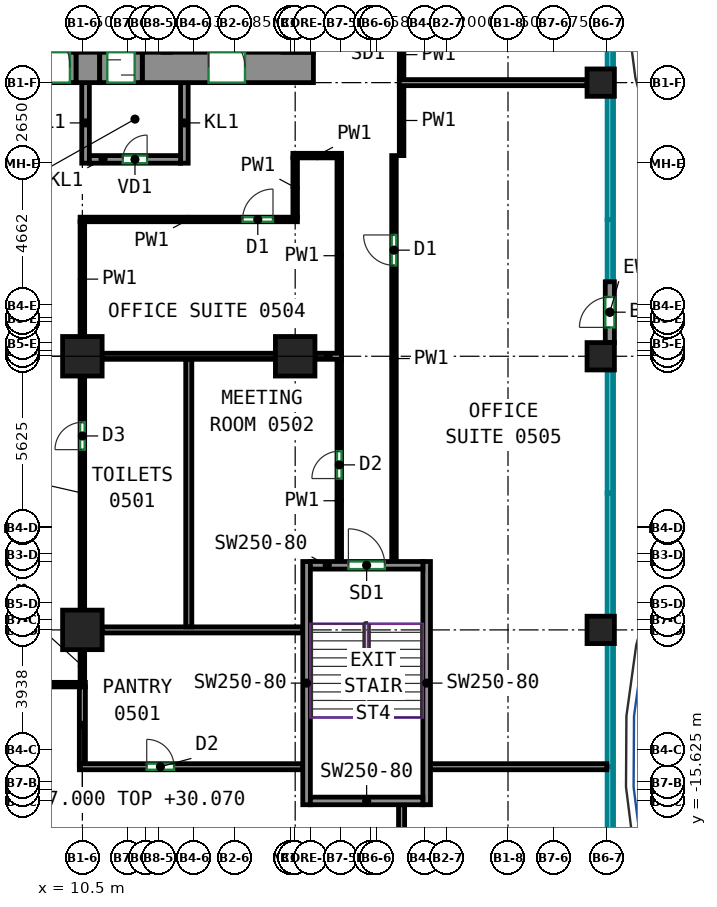
"""IFC4 building model, lengths in metres.
Left out: names, types, materials, properties, quantities, classifications, styles, units other than length and angle.
Written with IfcOpenShell. Run it as: python <this file> out.ifc"""

import sys

from ifc_helpers import new_model, si_unit, direction, frame, frame_2d, origin, origin_2d, place, context, subcontext, project, spatial, rectangle, extrude, source, transform, mapped, element, fill, save


model = new_model("IFC4")
c1 = context("Model", 3, precision=1e-05, world=origin(), true_north=direction((0.0, 1.0)))
c2 = subcontext(c1, "Body", "Model", "MODEL_VIEW")
j1 = project(units=[si_unit("LENGTHUNIT", "METRE"), si_unit("PLANEANGLEUNIT", "RADIAN")], contexts=[c1])
p1 = place(None, origin())
s1 = spatial("IfcSite", under=j1, at=p1, CompositionType="ELEMENT")
p2 = place(p1, origin())
s2 = spatial("IfcBuilding", under=s1, at=p2, CompositionType="ELEMENT")
p3 = place(p2, frame((0.0, 0.0, 27.0)))
s3 = spatial("IfcBuildingStorey", under=s2, at=p3, CompositionType="ELEMENT", Elevation=27.0)
m1 = source(origin(), c2, "Body", "SweptSolid", [
    extrude(rectangle(XDim=1.3, YDim=1.3, at=origin_2d()), origin(), (0.0, 0.0, 1.0), 3.72),
])
for number, where, z_axis, x_axis in (
    (1, (10.5, -10.0, 0.0), (0.0, 0.0, 1.0), (1.0, 0.0, 0.0)),
    (2, (10.5, -1.0, 0.0), (0.0, 0.0, 1.0), (1.0, 0.0, 0.0)),
    (3, (17.5, -1.0, 0.0), (0.0, 0.0, 1.0), (1.0, 0.0, 0.0)),
):
    element("IfcColumn", number, at=place(p3, frame(where, z_axis=z_axis, x_axis=x_axis)), inside=s3, PredefinedType="COLUMN", context=c2, shape_type="MappedRepresentation", body=[
        mapped(m1, transform((0.0, 0.0, 0.0))),
    ])
m2 = source(origin(), c2, "Body", "SweptSolid", [
    extrude(rectangle(XDim=0.9, YDim=0.9, at=origin_2d()), origin(), (0.0, 0.0, 1.0), 3.72),
])
for number, where, z_axis, x_axis in (
    (4, (27.55, -10.0, 0.0), (0.0, 0.0, 1.0), (1.0, 0.0, 0.0)),
    (5, (27.55, -1.0, 0.0), (0.0, 0.0, 1.0), (1.0, 0.0, 0.0)),
    (6, (27.55, 8.0, 0.0), (0.0, 0.0, 1.0), (1.0, 0.0, 0.0)),
):
    element("IfcColumn", number, at=place(p3, frame(where, z_axis=z_axis, x_axis=x_axis)), inside=s3, PredefinedType="COLUMN", context=c2, shape_type="MappedRepresentation", body=[
        mapped(m2, transform((0.0, 0.0, 0.0))),
    ])
m3 = source(origin(), c2, "Body", "SweptSolid", [
    extrude(rectangle(XDim=0.78, YDim=1.0, at=frame_2d((0.39, 0.0))), origin(), (0.0, 0.0, 1.0), 3.72),
])
p4 = place(p3, frame((10.29, 8.5, 0.0), z_axis=(0.0, 0.0, 1.0), x_axis=(1.0, 0.0, 0.0)))
e7 = element("IfcWall", 7, at=p4, inside=s3, PredefinedType="SHEAR", context=c2, shape_type="MappedRepresentation", body=[
    mapped(m3, transform((0.0, 0.0, 0.0))),
])
m4 = source(origin(), c2, "Body", "SweptSolid", [
    extrude(rectangle(XDim=5.63, YDim=1.0, at=frame_2d((2.815, 0.0))), origin(), (0.0, 0.0, 1.0), 3.72),
])
p5 = place(p3, frame((12.47, 8.5, 0.0), z_axis=(0.0, 0.0, 1.0), x_axis=(1.0, 0.0, 0.0)))
e8 = element("IfcWall", 8, at=p5, inside=s3, PredefinedType="SHEAR", context=c2, shape_type="MappedRepresentation", body=[
    mapped(m4, transform((0.0, 0.0, 0.0))),
])
p6 = place(p5, frame((2.18, 0.0, 0.0)))
e9 = element("IfcOpeningElement", 9, at=p6, cuts=e8, PredefinedType="OPENING", context=c2, shape_type="SweptSolid", body=[
    extrude(rectangle(XDim=1.2, YDim=2.1, at=frame_2d((0.6, 1.05))), frame((0.0, 0.51, 0.0), z_axis=(0.0, -1.0, 0.0), x_axis=(1.0, 0.0, 0.0)), (0.0, 0.0, 1.0), 1.02),
])
m5 = source(origin(), c2, "Body", "SweptSolid", [
    extrude(rectangle(XDim=8.0, YDim=0.25, at=frame_2d((4.0, 0.0))), origin(), (0.0, 0.0, 1.0), 3.72),
])
for number, where, z_axis, x_axis in (
    (10, (17.875, -15.75, 0.0), (0.0, 0.0, 1.0), (0.0, 1.0, 0.0)),
    (11, (21.825, -15.75, 0.0), (0.0, 0.0, 1.0), (0.0, 1.0, 0.0)),
):
    element("IfcWall", number, at=place(p3, frame(where, z_axis=z_axis, x_axis=x_axis)), inside=s3, PredefinedType="SHEAR", context=c2, shape_type="MappedRepresentation", body=[
        mapped(m5, transform((0.0, 0.0, 0.0))),
    ])
m6 = source(origin(), c2, "Body", "SweptSolid", [
    extrude(rectangle(XDim=3.7, YDim=0.25, at=frame_2d((1.85, 0.0))), origin(), (0.0, 0.0, 1.0), 3.72),
])
p7 = place(p3, frame((18.0, -15.625, 0.0), z_axis=(0.0, 0.0, 1.0), x_axis=(1.0, 0.0, 0.0)))
e12 = element("IfcWall", 12, at=p7, inside=s3, PredefinedType="SHEAR", context=c2, shape_type="MappedRepresentation", body=[
    mapped(m6, transform((0.0, 0.0, 0.0))),
])
p8 = place(p3, frame((18.0, -7.875, 0.0), z_axis=(0.0, 0.0, 1.0), x_axis=(1.0, 0.0, 0.0)))
e13 = element("IfcWall", 13, at=p8, inside=s3, PredefinedType="SHEAR", context=c2, shape_type="MappedRepresentation", body=[
    mapped(m6, transform((0.0, 0.0, 0.0))),
])
p9 = place(p8, frame((1.25, 0.0, 0.0)))
e14 = element("IfcOpeningElement", 14, at=p9, cuts=e13, PredefinedType="OPENING", context=c2, shape_type="SweptSolid", body=[
    extrude(rectangle(XDim=1.2, YDim=2.1, at=frame_2d((0.6, 1.05))), frame((0.0, 0.135, 0.0), z_axis=(0.0, -1.0, 0.0), x_axis=(1.0, 0.0, 0.0)), (0.0, 0.0, 1.0), 0.27),
])
m7 = source(origin(), c2, "Body", "SweptSolid", [
    extrude(rectangle(XDim=2.0, YDim=0.3, at=frame_2d((1.0, 0.0))), origin(), (0.0, 0.0, 1.0), 3.72),
])
p10 = place(p3, frame((27.85, -0.55, 0.0), z_axis=(0.0, 0.0, 1.0), x_axis=(0.0, 1.0, 0.0)))
e15 = element("IfcWall", 15, at=p10, inside=s3, PredefinedType="SOLIDWALL", context=c2, shape_type="MappedRepresentation", body=[
    mapped(m7, transform((0.0, 0.0, 0.0))),
])
p11 = place(p10, frame((0.5, 0.0, 0.0)))
e16 = element("IfcOpeningElement", 16, at=p11, cuts=e15, PredefinedType="OPENING", context=c2, shape_type="SweptSolid", body=[
    extrude(rectangle(XDim=1.0, YDim=2.1, at=frame_2d((0.5, 1.05))), frame((0.0, 0.16, 0.0), z_axis=(0.0, -1.0, 0.0), x_axis=(1.0, 0.0, 0.0)), (0.0, 0.0, 1.0), 0.32),
])
m8 = source(origin(), c2, "Body", "SweptSolid", [
    extrude(rectangle(XDim=2.65, YDim=0.25, at=frame_2d((1.325, 0.0))), origin(), (0.0, 0.0, 1.0), 3.72),
])
for number, where, z_axis, x_axis in (
    (17, (10.605, 5.35, 0.0), (0.0, 0.0, 1.0), (0.0, 1.0, 0.0)),
    (18, (13.855, 5.35, 0.0), (0.0, 0.0, 1.0), (0.0, 1.0, 0.0)),
):
    element("IfcWall", number, at=place(p3, frame(where, z_axis=z_axis, x_axis=x_axis)), inside=s3, PredefinedType="PARTITIONING", context=c2, shape_type="MappedRepresentation", body=[
        mapped(m8, transform((0.0, 0.0, 0.0))),
    ])
m9 = source(origin(), c2, "Body", "SweptSolid", [
    extrude(rectangle(XDim=3.0, YDim=0.25, at=frame_2d((1.5, 0.0))), origin(), (0.0, 0.0, 1.0), 3.72),
])
p12 = place(p3, frame((10.73, 5.475, 0.0), z_axis=(0.0, 0.0, 1.0), x_axis=(1.0, 0.0, 0.0)))
e19 = element("IfcWall", 19, at=p12, inside=s3, PredefinedType="PARTITIONING", context=c2, shape_type="MappedRepresentation", body=[
    mapped(m9, transform((0.0, 0.0, 0.0))),
])
p13 = place(p12, frame((1.1, 0.0, 0.0)))
e20 = element("IfcOpeningElement", 20, at=p13, cuts=e19, PredefinedType="OPENING", context=c2, shape_type="SweptSolid", body=[
    extrude(rectangle(XDim=0.8, YDim=2.0, at=frame_2d((0.4, 1.0))), frame((0.0, 0.135, 0.0), z_axis=(0.0, -1.0, 0.0), x_axis=(1.0, 0.0, 0.0)), (0.0, 0.0, 1.0), 0.27),
])
m10 = source(origin(), c2, "Body", "SweptSolid", [
    extrude(rectangle(XDim=2.4, YDim=1.0, at=frame_2d((1.2, 0.0))), origin(), (0.0, 0.0, 1.0), 2.7),
])
p14 = place(p3, frame((7.89, 8.5, 0.0), z_axis=(0.0, 0.0, 1.0), x_axis=(1.0, 0.0, 0.0)))
e21 = element("IfcWall", 21, at=p14, inside=s3, PredefinedType="PARTITIONING", context=c2, shape_type="MappedRepresentation", body=[
    mapped(m10, transform((0.0, 0.0, 0.0))),
])
p15 = place(p14, frame((0.2, 0.0, 0.0)))
e22 = element("IfcOpeningElement", 22, at=p15, cuts=e21, PredefinedType="OPENING", context=c2, shape_type="SweptSolid", body=[
    extrude(rectangle(XDim=2.0, YDim=2.1, at=frame_2d((1.0, 1.05))), frame((0.0, 0.51, 0.0), z_axis=(0.0, -1.0, 0.0), x_axis=(1.0, 0.0, 0.0)), (0.0, 0.0, 1.0), 1.02),
])
m11 = source(origin(), c2, "Body", "SweptSolid", [
    extrude(rectangle(XDim=1.4, YDim=1.0, at=frame_2d((0.7, 0.0))), origin(), (0.0, 0.0, 1.0), 2.7),
])
p16 = place(p3, frame((11.07, 8.5, 0.0), z_axis=(0.0, 0.0, 1.0), x_axis=(1.0, 0.0, 0.0)))
e23 = element("IfcWall", 23, at=p16, inside=s3, PredefinedType="PARTITIONING", context=c2, shape_type="MappedRepresentation", body=[
    mapped(m11, transform((0.0, 0.0, 0.0))),
])
p17 = place(p16, frame((0.25, 0.0, 0.0)))
e24 = element("IfcOpeningElement", 24, at=p17, cuts=e23, PredefinedType="OPENING", context=c2, shape_type="SweptSolid", body=[
    extrude(rectangle(XDim=0.9, YDim=2.1, at=frame_2d((0.45, 1.05))), frame((0.0, 0.51, 0.0), z_axis=(0.0, -1.0, 0.0), x_axis=(1.0, 0.0, 0.0)), (0.0, 0.0, 1.0), 1.02),
])
p18 = place(p3, frame((-10.575, -11.8, 0.0), z_axis=(0.0, 0.0, 1.0), x_axis=(1.0, 0.0, 0.0)))
e25 = element("IfcWall", 25, at=p18, inside=s3, PredefinedType="PARTITIONING", context=c2, shape_type="SweptSolid", body=[
    extrude(rectangle(XDim=21.175, YDim=0.15, at=frame_2d((10.587, 0.0))), origin(), (0.0, 0.0, 1.0), 3.72),
])
p19 = place(p18, frame((4.544, 0.0, 0.0)))
e26 = element("IfcOpeningElement", 26, at=p19, cuts=e25, PredefinedType="OPENING", context=c2, shape_type="SweptSolid", body=[
    extrude(rectangle(XDim=1.8, YDim=2.1, at=frame_2d((0.9, 1.05))), frame((0.0, 0.085, 0.0), z_axis=(0.0, -1.0, 0.0), x_axis=(1.0, 0.0, 0.0)), (0.0, 0.0, 1.0), 0.17),
])
p20 = place(p18, frame((17.372, 0.0, 0.0)))
e27 = element("IfcOpeningElement", 27, at=p20, cuts=e25, PredefinedType="OPENING", context=c2, shape_type="SweptSolid", body=[
    extrude(rectangle(XDim=0.9, YDim=2.1, at=frame_2d((0.45, 1.05))), frame((0.0, 0.085, 0.0), z_axis=(0.0, -1.0, 0.0), x_axis=(1.0, 0.0, 0.0)), (0.0, 0.0, 1.0), 0.17),
])
p21 = place(p3, frame((10.5, -11.725, 0.0), z_axis=(0.0, 0.0, 1.0), x_axis=(0.0, 1.0, 0.0)))
e28 = element("IfcWall", 28, at=p21, inside=s3, PredefinedType="PARTITIONING", context=c2, shape_type="SweptSolid", body=[
    extrude(rectangle(XDim=1.075, YDim=0.15, at=frame_2d((0.538, 0.0))), origin(), (0.0, 0.0, 1.0), 3.07),
])
p22 = place(p3, frame((10.5, -9.35, 0.0), z_axis=(0.0, 0.0, 1.0), x_axis=(0.0, 1.0, 0.0)))
e29 = element("IfcWall", 29, at=p22, inside=s3, PredefinedType="PARTITIONING", context=c2, shape_type="SweptSolid", body=[
    extrude(rectangle(XDim=7.7, YDim=0.15, at=frame_2d((3.85, 0.0))), origin(), (0.0, 0.0, 1.0), 3.07),
])
p23 = place(p22, frame((5.279, 0.0, 0.0)))
e30 = element("IfcOpeningElement", 30, at=p23, cuts=e29, PredefinedType="OPENING", context=c2, shape_type="SweptSolid", body=[
    extrude(rectangle(XDim=0.9, YDim=2.1, at=frame_2d((0.45, 1.05))), frame((0.0, 0.085, 0.0), z_axis=(0.0, -1.0, 0.0), x_axis=(1.0, 0.0, 0.0)), (0.0, 0.0, 1.0), 0.17),
])
p24 = place(p3, frame((18.95, -7.75, 0.0), z_axis=(0.0, 0.0, 1.0), x_axis=(0.0, 1.0, 0.0)))
e31 = element("IfcWall", 31, at=p24, inside=s3, PredefinedType="PARTITIONING", context=c2, shape_type="SweptSolid", body=[
    extrude(rectangle(XDim=6.66, YDim=0.15, at=frame_2d((3.33, 0.0))), origin(), (0.0, 0.0, 1.0), 3.72),
])
p25 = place(p24, frame((2.728, 0.0, 0.0)))
e32 = element("IfcOpeningElement", 32, at=p25, cuts=e31, PredefinedType="OPENING", context=c2, shape_type="SweptSolid", body=[
    extrude(rectangle(XDim=0.9, YDim=2.1, at=frame_2d((0.45, 1.05))), frame((0.0, 0.085, 0.0), z_axis=(0.0, -1.0, 0.0), x_axis=(1.0, 0.0, 0.0)), (0.0, 0.0, 1.0), 0.17),
])
p26 = place(p3, frame((18.95, -0.91, 0.0), z_axis=(0.0, 0.0, 1.0), x_axis=(0.0, 1.0, 0.0)))
e33 = element("IfcWall", 33, at=p26, inside=s3, PredefinedType="PARTITIONING", context=c2, shape_type="SweptSolid", body=[
    extrude(rectangle(XDim=6.435, YDim=0.15, at=frame_2d((3.217, 0.0))), origin(), (0.0, 0.0, 1.0), 3.72),
])
p27 = place(p3, frame((17.425, 5.6, 0.0), z_axis=(0.0, 0.0, 1.0), x_axis=(1.0, 0.0, 0.0)))
e34 = element("IfcWall", 34, at=p27, inside=s3, PredefinedType="PARTITIONING", context=c2, shape_type="SweptSolid", body=[
    extrude(rectangle(XDim=1.6, YDim=0.15, at=frame_2d((0.8, 0.0))), origin(), (0.0, 0.0, 1.0), 3.72),
])
p28 = place(p3, frame((17.5, 3.575, 0.0), z_axis=(0.0, 0.0, 1.0), x_axis=(0.0, 1.0, 0.0)))
e35 = element("IfcWall", 35, at=p28, inside=s3, PredefinedType="PARTITIONING", context=c2, shape_type="SweptSolid", body=[
    extrude(rectangle(XDim=1.95, YDim=0.15, at=frame_2d((0.975, 0.0))), origin(), (0.0, 0.0, 1.0), 3.72),
])
p29 = place(p3, frame((10.425, 3.5, 0.0), z_axis=(0.0, 0.0, 1.0), x_axis=(1.0, 0.0, 0.0)))
e36 = element("IfcWall", 36, at=p29, inside=s3, PredefinedType="PARTITIONING", context=c2, shape_type="SweptSolid", body=[
    extrude(rectangle(XDim=7.15, YDim=0.15, at=frame_2d((3.575, 0.0))), origin(), (0.0, 0.0, 1.0), 3.72),
])
p30 = place(p29, frame((5.345, 0.0, 0.0)))
e37 = element("IfcOpeningElement", 37, at=p30, cuts=e36, PredefinedType="OPENING", context=c2, shape_type="SweptSolid", body=[
    extrude(rectangle(XDim=1.0, YDim=2.1, at=frame_2d((0.5, 1.05))), frame((0.0, 0.085, 0.0), z_axis=(0.0, -1.0, 0.0), x_axis=(1.0, 0.0, 0.0)), (0.0, 0.0, 1.0), 0.17),
])
p31 = place(p3, frame((10.5, -0.35, 0.0), z_axis=(0.0, 0.0, 1.0), x_axis=(0.0, 1.0, 0.0)))
e38 = element("IfcWall", 38, at=p31, inside=s3, PredefinedType="PARTITIONING", context=c2, shape_type="SweptSolid", body=[
    extrude(rectangle(XDim=3.775, YDim=0.15, at=frame_2d((1.888, 0.0))), origin(), (0.0, 0.0, 1.0), 3.72),
])
p32 = place(p3, frame((21.0, 5.6, 0.0), z_axis=(0.0, 0.0, 1.0), x_axis=(0.0, 1.0, 0.0)))
e39 = element("IfcWall", 39, at=p32, inside=s3, PredefinedType="PARTITIONING", context=c2, shape_type="SweptSolid", body=[
    extrude(rectangle(XDim=2.31, YDim=0.15, at=frame_2d((1.155, 0.0))), origin(), (0.0, 0.0, 1.0), 3.72),
])
p33 = place(p3, frame((20.75, -7.75, 0.0), z_axis=(0.0, 0.0, 1.0), x_axis=(0.0, 1.0, 0.0)))
e40 = element("IfcWall", 40, at=p33, inside=s3, PredefinedType="PARTITIONING", context=c2, shape_type="SweptSolid", body=[
    extrude(rectangle(XDim=13.35, YDim=0.15, at=frame_2d((6.675, 0.0))), origin(), (0.0, 0.0, 1.0), 3.72),
])
p34 = place(p33, frame((9.74, 0.0, 0.0)))
e41 = element("IfcOpeningElement", 41, at=p34, cuts=e40, PredefinedType="OPENING", context=c2, shape_type="SweptSolid", body=[
    extrude(rectangle(XDim=1.0, YDim=2.1, at=frame_2d((0.5, 1.05))), frame((0.0, 0.085, 0.0), z_axis=(0.0, -1.0, 0.0), x_axis=(1.0, 0.0, 0.0)), (0.0, 0.0, 1.0), 0.17),
])
p35 = place(p3, frame((21.0, 8.09, 0.0), z_axis=(0.0, 0.0, 1.0), x_axis=(0.0, 1.0, 0.0)))
e42 = element("IfcWall", 42, at=p35, inside=s3, PredefinedType="PARTITIONING", context=c2, shape_type="SweptSolid", body=[
    extrude(rectangle(XDim=1.66, YDim=0.15, at=frame_2d((0.83, 0.0))), origin(), (0.0, 0.0, 1.0), 3.72),
])
p36 = place(p3, frame((21.0, -15.75, 0.0), z_axis=(0.0, 0.0, 1.0), x_axis=(0.0, -1.0, 0.0)))
e43 = element("IfcWall", 43, at=p36, inside=s3, PredefinedType="PARTITIONING", context=c2, shape_type="SweptSolid", body=[
    extrude(rectangle(XDim=3.15, YDim=0.2, at=frame_2d((1.575, 0.0))), origin(), (0.0, 0.0, 1.0), 3.72),
])
p37 = place(p3, frame((21.95, -14.5, 0.0), z_axis=(0.0, 0.0, 1.0), x_axis=(1.0, 0.0, 0.0)))
e44 = element("IfcWall", 44, at=p37, inside=s3, PredefinedType="PARTITIONING", context=c2, shape_type="SweptSolid", body=[
    extrude(rectangle(XDim=5.8, YDim=0.2, at=frame_2d((2.9, 0.0))), origin(), (0.0, 0.0, 1.0), 3.72),
])
p38 = place(p3, frame((10.5, -14.4, 0.0), z_axis=(0.0, 0.0, 1.0), x_axis=(0.0, 1.0, 0.0)))
e45 = element("IfcWall", 45, at=p38, inside=s3, PredefinedType="PARTITIONING", context=c2, shape_type="SweptSolid", body=[
    extrude(rectangle(XDim=2.524, YDim=0.2, at=frame_2d((1.262, 0.0))), origin(), (0.0, 0.0, 1.0), 3.07),
])
p39 = place(p3, frame((10.4, -14.5, 0.0), z_axis=(0.0, 0.0, 1.0), x_axis=(1.0, 0.0, 0.0)))
e46 = element("IfcWall", 46, at=p39, inside=s3, PredefinedType="PARTITIONING", context=c2, shape_type="SweptSolid", body=[
    extrude(rectangle(XDim=7.35, YDim=0.2, at=frame_2d((3.675, 0.0))), origin(), (0.0, 0.0, 1.0), 3.72),
])
p40 = place(p39, frame((2.217, 0.0, 0.0)))
e47 = element("IfcOpeningElement", 47, at=p40, cuts=e46, PredefinedType="OPENING", context=c2, shape_type="SweptSolid", body=[
    extrude(rectangle(XDim=0.9, YDim=2.1, at=frame_2d((0.45, 1.05))), frame((0.0, 0.11, 0.0), z_axis=(0.0, -1.0, 0.0), x_axis=(1.0, 0.0, 0.0)), (0.0, 0.0, 1.0), 0.22),
])
p41 = place(p3, frame((11.15, -10.0, 0.0), z_axis=(0.0, 0.0, 1.0), x_axis=(1.0, 0.0, 0.0)))
e48 = element("IfcWall", 48, at=p41, inside=s3, PredefinedType="PARTITIONING", context=c2, shape_type="SweptSolid", body=[
    extrude(rectangle(XDim=6.6, YDim=0.2, at=frame_2d((3.3, 0.0))), origin(), (0.0, 0.0, 1.0), 3.72),
])
p42 = place(p3, frame((14.0, -9.9, 0.0), z_axis=(0.0, 0.0, 1.0), x_axis=(0.0, 1.0, 0.0)))
e49 = element("IfcWall", 49, at=p42, inside=s3, PredefinedType="PARTITIONING", context=c2, shape_type="SweptSolid", body=[
    extrude(rectangle(XDim=8.8, YDim=0.2, at=frame_2d((4.4, 0.0))), origin(), (0.0, 0.0, 1.0), 3.72),
])
p43 = place(p3, frame((11.15, -1.0, 0.0), z_axis=(0.0, 0.0, 1.0), x_axis=(1.0, 0.0, 0.0)))
e50 = element("IfcWall", 50, at=p43, inside=s3, PredefinedType="PARTITIONING", context=c2, shape_type="SweptSolid", body=[
    extrude(rectangle(XDim=5.7, YDim=0.2, at=frame_2d((2.85, 0.0))), origin(), (0.0, 0.0, 1.0), 3.72),
])
p44 = place(p3, frame((18.15, -1.0, 0.0), z_axis=(0.0, 0.0, 1.0), x_axis=(1.0, 0.0, 0.0)))
e51 = element("IfcWall", 51, at=p44, inside=s3, PredefinedType="PARTITIONING", context=c2, shape_type="SweptSolid", body=[
    extrude(rectangle(XDim=0.874, YDim=0.2, at=frame_2d((0.437, 0.0))), origin(), (0.0, 0.0, 1.0), 3.07),
])
p45 = place(p3, frame((20.926, 8.0, 0.0), z_axis=(0.0, 0.0, 1.0), x_axis=(1.0, 0.0, 0.0)))
e52 = element("IfcWall", 52, at=p45, inside=s3, PredefinedType="PARTITIONING", context=c2, shape_type="SweptSolid", body=[
    extrude(rectangle(XDim=6.174, YDim=0.2, at=frame_2d((3.087, 0.0))), origin(), (0.0, 0.0, 1.0), 3.72),
])
p46 = place(p11, origin())
e53 = element("IfcDoor", 53, at=p46, inside=s3, OperationType="SINGLE_SWING_LEFT", PredefinedType="DOOR", context=c2, shape_type="SweptSolid", body=[
    extrude(rectangle(XDim=1.0, YDim=2.1, at=frame_2d((0.5, 1.05))), frame((0.0, 0.025, 0.0), z_axis=(0.0, -1.0, 0.0), x_axis=(1.0, 0.0, 0.0)), (0.0, 0.0, 1.0), 0.05),
])
fill(e16, e53)
p47 = place(p15, origin())
e54 = element("IfcDoor", 54, at=p47, inside=s3, OperationType="DOUBLE_DOOR_SINGLE_SWING", PredefinedType="DOOR", context=c2, shape_type="SweptSolid", body=[
    extrude(rectangle(XDim=2.0, YDim=2.1, at=frame_2d((1.0, 1.05))), frame((0.0, 0.405, 0.0), z_axis=(0.0, -1.0, 0.0), x_axis=(1.0, 0.0, 0.0)), (0.0, 0.0, 1.0), 0.05),
])
fill(e22, e54)
p48 = place(p13, origin())
e55 = element("IfcDoor", 55, at=p48, inside=s3, OperationType="SINGLE_SWING_RIGHT", PredefinedType="DOOR", context=c2, shape_type="SweptSolid", body=[
    extrude(rectangle(XDim=0.8, YDim=2.0, at=frame_2d((0.4, 1.0))), frame((0.0, 0.025, 0.0), z_axis=(0.0, -1.0, 0.0), x_axis=(1.0, 0.0, 0.0)), (0.0, 0.0, 1.0), 0.05),
])
fill(e20, e55)
p49 = place(p17, origin())
e56 = element("IfcDoor", 56, at=p49, inside=s3, OperationType="SLIDING_TO_LEFT", PredefinedType="DOOR", context=c2, shape_type="SweptSolid", body=[
    extrude(rectangle(XDim=0.9, YDim=2.1, at=frame_2d((0.45, 1.05))), frame((0.0, 0.405, 0.0), z_axis=(0.0, -1.0, 0.0), x_axis=(1.0, 0.0, 0.0)), (0.0, 0.0, 1.0), 0.05),
])
fill(e24, e56)
p50 = place(p6, origin())
e57 = element("IfcDoor", 57, at=p50, inside=s3, OperationType="DOUBLE_DOOR_SINGLE_SWING", PredefinedType="DOOR", context=c2, shape_type="SweptSolid", body=[
    extrude(rectangle(XDim=1.2, YDim=2.1, at=frame_2d((0.6, 1.05))), frame((0.0, 0.405, 0.0), z_axis=(0.0, -1.0, 0.0), x_axis=(1.0, 0.0, 0.0)), (0.0, 0.0, 1.0), 0.05),
])
fill(e9, e57)
p51 = place(p9, origin())
e58 = element("IfcDoor", 58, at=p51, inside=s3, OperationType="DOUBLE_DOOR_SINGLE_SWING", PredefinedType="DOOR", context=c2, shape_type="SweptSolid", body=[
    extrude(rectangle(XDim=1.2, YDim=2.1, at=frame_2d((0.6, 1.05))), frame((0.0, 0.025, 0.0), z_axis=(0.0, -1.0, 0.0), x_axis=(1.0, 0.0, 0.0)), (0.0, 0.0, 1.0), 0.05),
])
fill(e14, e58)
p52 = place(p40, origin())
e59 = element("IfcDoor", 59, at=p52, inside=s3, OperationType="SINGLE_SWING_LEFT", PredefinedType="DOOR", context=c2, shape_type="SweptSolid", body=[
    extrude(rectangle(XDim=0.9, YDim=2.1, at=frame_2d((0.45, 1.05))), frame((0.0, 0.025, 0.0), z_axis=(0.0, -1.0, 0.0), x_axis=(1.0, 0.0, 0.0)), (0.0, 0.0, 1.0), 0.05),
])
fill(e47, e59)
p53 = place(p25, origin())
e60 = element("IfcDoor", 60, at=p53, inside=s3, OperationType="SINGLE_SWING_LEFT", PredefinedType="DOOR", context=c2, shape_type="SweptSolid", body=[
    extrude(rectangle(XDim=0.9, YDim=2.1, at=frame_2d((0.45, 1.05))), frame((0.0, 0.025, 0.0), z_axis=(0.0, -1.0, 0.0), x_axis=(1.0, 0.0, 0.0)), (0.0, 0.0, 1.0), 0.05),
])
fill(e32, e60)
p54 = place(p23, origin())
e61 = element("IfcDoor", 61, at=p54, inside=s3, OperationType="SINGLE_SWING_LEFT", PredefinedType="DOOR", context=c2, shape_type="SweptSolid", body=[
    extrude(rectangle(XDim=0.9, YDim=2.1, at=frame_2d((0.45, 1.05))), frame((0.0, 0.025, 0.0), z_axis=(0.0, -1.0, 0.0), x_axis=(1.0, 0.0, 0.0)), (0.0, 0.0, 1.0), 0.05),
])
fill(e30, e61)
p55 = place(p34, origin())
e62 = element("IfcDoor", 62, at=p55, inside=s3, OperationType="SINGLE_SWING_RIGHT", PredefinedType="DOOR", context=c2, shape_type="SweptSolid", body=[
    extrude(rectangle(XDim=1.0, YDim=2.1, at=frame_2d((0.5, 1.05))), frame((0.0, 0.025, 0.0), z_axis=(0.0, -1.0, 0.0), x_axis=(1.0, 0.0, 0.0)), (0.0, 0.0, 1.0), 0.05),
])
fill(e41, e62)
p56 = place(p30, origin())
e63 = element("IfcDoor", 63, at=p56, inside=s3, OperationType="SINGLE_SWING_RIGHT", PredefinedType="DOOR", context=c2, shape_type="SweptSolid", body=[
    extrude(rectangle(XDim=1.0, YDim=2.1, at=frame_2d((0.5, 1.05))), frame((0.0, 0.025, 0.0), z_axis=(0.0, -1.0, 0.0), x_axis=(1.0, 0.0, 0.0)), (0.0, 0.0, 1.0), 0.05),
])
fill(e37, e63)
save(model, sys.argv[1])
